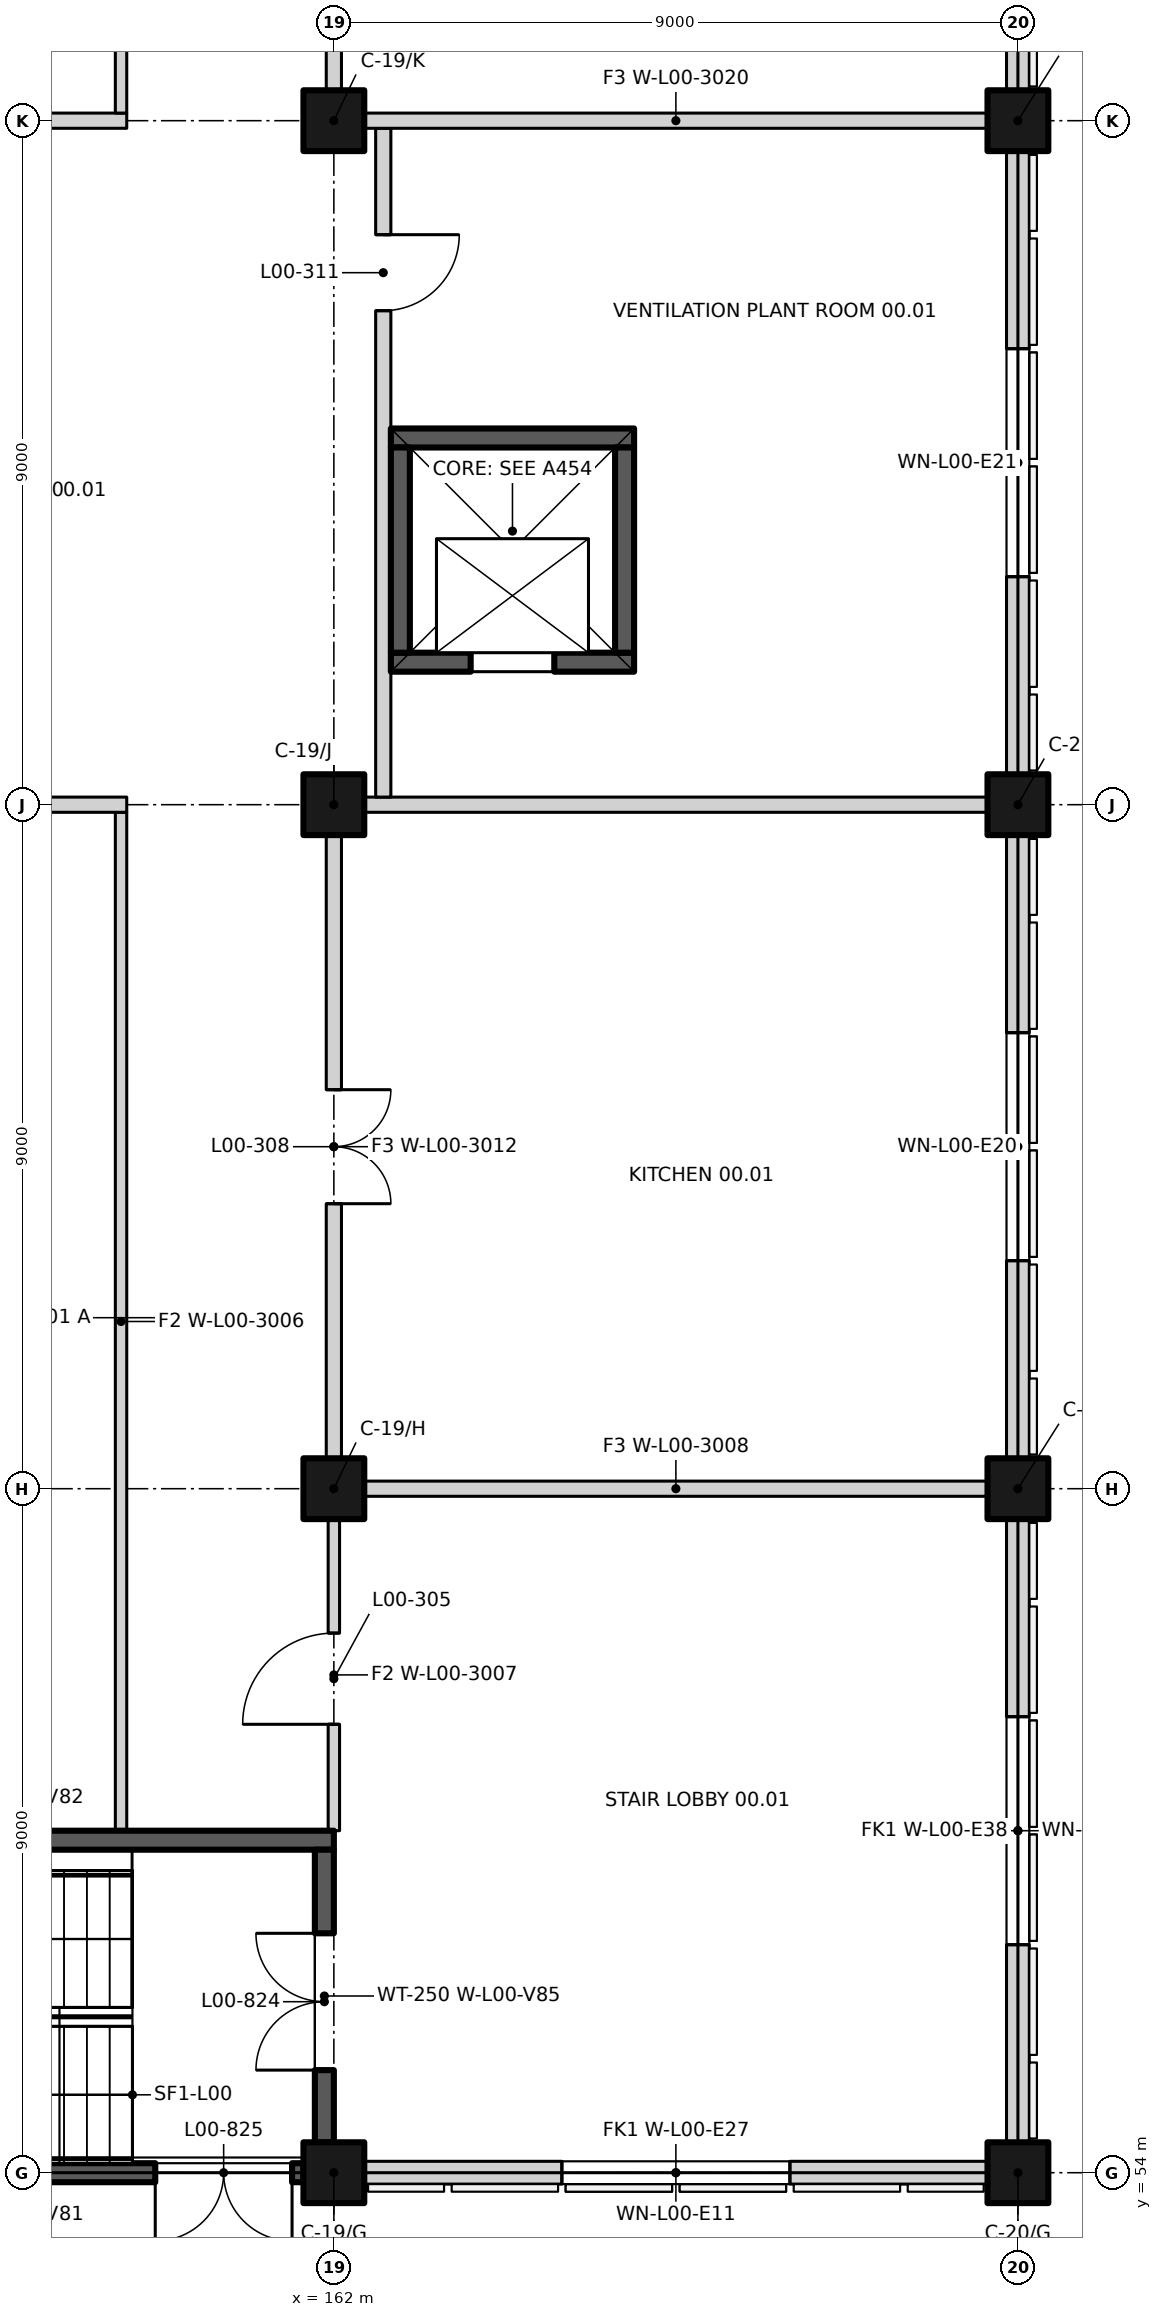
"""IFC4 building model, lengths in metres.
Left out: names, types, materials, properties, quantities, classifications, styles, units other than length and angle.
Written with IfcOpenShell. Run it as: python <this file> out.ifc"""

import sys

from ifc_helpers import new_model, si_unit, direction, frame, frame_2d, origin, origin_2d, place, context, subcontext, project, spatial, rectangle, extrude, element, fill, save


model = new_model("IFC4")
c1 = context("Model", 3, precision=1e-05, world=origin(), true_north=direction((0.0, 1.0)))
c2 = subcontext(c1, "Body", "Model", "MODEL_VIEW")
j1 = project(units=[si_unit("LENGTHUNIT", "METRE"), si_unit("PLANEANGLEUNIT", "RADIAN")], contexts=[c1])
p1 = place(None, origin())
s1 = spatial("IfcSite", under=j1, at=p1, CompositionType="ELEMENT")
p2 = place(p1, origin())
s2 = spatial("IfcBuilding", under=s1, at=p2, CompositionType="ELEMENT")
p3 = place(p2, origin())
s3 = spatial("IfcBuildingStorey", under=s2, at=p3, CompositionType="ELEMENT", Elevation=0.0)
for number, where, z_axis, x_axis in (
    (1, (162.0, 54.0, 0.0), (0.0, 0.0, 1.0), (1.0, 0.0, 0.0)),
    (2, (171.0, 54.0, 0.0), (0.0, 0.0, 1.0), (1.0, 0.0, 0.0)),
    (3, (162.0, 63.0, 0.0), (0.0, 0.0, 1.0), (1.0, 0.0, 0.0)),
    (4, (171.0, 63.0, 0.0), (0.0, 0.0, 1.0), (1.0, 0.0, 0.0)),
    (5, (162.0, 72.0, 0.0), (0.0, 0.0, 1.0), (1.0, 0.0, 0.0)),
    (6, (171.0, 72.0, 0.0), (0.0, 0.0, 1.0), (1.0, 0.0, 0.0)),
    (7, (162.0, 81.0, 0.0), (0.0, 0.0, 1.0), (1.0, 0.0, 0.0)),
    (8, (171.0, 81.0, 0.0), (0.0, 0.0, 1.0), (1.0, 0.0, 0.0)),
):
    element("IfcColumn", number, at=place(p3, frame(where, z_axis=z_axis, x_axis=x_axis)), inside=s3, PredefinedType="COLUMN", context=c2, shape_type="SweptSolid", body=[
        extrude(rectangle(XDim=0.8, YDim=0.8, at=origin_2d()), origin(), (0.0, 0.0, 1.0), 6.0),
    ])
p4 = place(p3, frame((153.4, 54.0, 0.0), z_axis=(0.0, 0.0, 1.0), x_axis=(1.0, 0.0, 0.0)))
e9 = element("IfcWall", 9, at=p4, inside=s3, PredefinedType="SHEAR", context=c2, shape_type="SweptSolid", body=[
    extrude(rectangle(XDim=8.2, YDim=0.25, at=frame_2d((4.1, 0.0))), origin(), (0.0, 0.0, 1.0), 6.0),
])
p5 = place(p4, frame((8.05, 0.0, 0.0), z_axis=(0.0, 0.0, 1.0), x_axis=(-1.0, 0.0, 0.0)))
e10 = element("IfcOpeningElement", 10, at=p5, cuts=e9, PredefinedType="OPENING", context=c2, shape_type="SweptSolid", body=[
    extrude(rectangle(XDim=1.8, YDim=2.1, at=frame_2d((0.9, 1.05))), frame((0.0, 0.135, 0.0), z_axis=(0.0, -1.0, 0.0), x_axis=(1.0, 0.0, 0.0)), (0.0, 0.0, 1.0), 0.27),
])
p6 = place(p3, frame((153.0, 58.375, 0.0), z_axis=(0.0, 0.0, 1.0), x_axis=(1.0, 0.0, 0.0)))
e11 = element("IfcWall", 11, at=p6, inside=s3, PredefinedType="SHEAR", context=c2, shape_type="SweptSolid", body=[
    extrude(rectangle(XDim=9.0, YDim=0.25, at=frame_2d((4.5, 0.0))), origin(), (0.0, 0.0, 1.0), 6.0),
])
p7 = place(p3, frame((161.875, 54.4, 0.0), z_axis=(0.0, 0.0, 1.0), x_axis=(0.0, 1.0, 0.0)))
e12 = element("IfcWall", 12, at=p7, inside=s3, PredefinedType="SHEAR", context=c2, shape_type="SweptSolid", body=[
    extrude(rectangle(XDim=3.85, YDim=0.25, at=frame_2d((1.925, 0.0))), origin(), (0.0, 0.0, 1.0), 6.0),
])
p8 = place(p7, frame((0.95, 0.0, 0.0)))
e13 = element("IfcOpeningElement", 13, at=p8, cuts=e12, PredefinedType="OPENING", context=c2, shape_type="SweptSolid", body=[
    extrude(rectangle(XDim=1.8, YDim=2.1, at=frame_2d((0.9, 1.05))), frame((0.0, 0.135, 0.0), z_axis=(0.0, -1.0, 0.0), x_axis=(1.0, 0.0, 0.0)), (0.0, 0.0, 1.0), 0.27),
])
p9 = place(p3, frame((162.75, 73.875, -1.6), z_axis=(0.0, 0.0, 1.0), x_axis=(1.0, 0.0, 0.0)))
e14 = element("IfcWall", 14, at=p9, inside=s3, PredefinedType="SHEAR", context=c2, shape_type="SweptSolid", body=[
    extrude(rectangle(XDim=3.2, YDim=0.25, at=frame_2d((1.6, 0.0))), origin(), (0.0, 0.0, 1.0), 7.6),
])
p10 = place(p9, frame((1.05, 0.0, 1.6)))
e15 = element("IfcOpeningElement", 15, at=p10, cuts=e14, PredefinedType="OPENING", context=c2, shape_type="SweptSolid", body=[
    extrude(rectangle(XDim=1.1, YDim=2.1, at=frame_2d((0.55, 1.05))), frame((0.0, 0.135, 0.0), z_axis=(0.0, -1.0, 0.0), x_axis=(1.0, 0.0, 0.0)), (0.0, 0.0, 1.0), 0.27),
])
p11 = place(p3, frame((162.75, 76.825, -1.6), z_axis=(0.0, 0.0, 1.0), x_axis=(1.0, 0.0, 0.0)))
e16 = element("IfcWall", 16, at=p11, inside=s3, PredefinedType="SHEAR", context=c2, shape_type="SweptSolid", body=[
    extrude(rectangle(XDim=3.2, YDim=0.25, at=frame_2d((1.6, 0.0))), origin(), (0.0, 0.0, 1.0), 7.6),
])
for number, where, z_axis, x_axis in (
    (17, (162.875, 74.0, -1.6), (0.0, 0.0, 1.0), (0.0, 1.0, 0.0)),
    (18, (165.825, 74.0, -1.6), (0.0, 0.0, 1.0), (0.0, 1.0, 0.0)),
):
    element("IfcWall", number, at=place(p3, frame(where, z_axis=z_axis, x_axis=x_axis)), inside=s3, PredefinedType="SHEAR", context=c2, shape_type="SweptSolid", body=[
        extrude(rectangle(XDim=2.7, YDim=0.25, at=frame_2d((1.35, 0.0))), origin(), (0.0, 0.0, 1.0), 7.6),
    ])
p12 = place(p3, frame((170.6, 54.0, 0.0), z_axis=(0.0, 0.0, 1.0), x_axis=(-1.0, 0.0, 0.0)))
e19 = element("IfcWall", 19, at=p12, inside=s3, PredefinedType="SOLIDWALL", context=c2, shape_type="SweptSolid", body=[
    extrude(rectangle(XDim=8.2, YDim=0.3, at=frame_2d((4.1, 0.0))), origin(), (0.0, 0.0, 1.0), 5.2),
])
p13 = place(p12, frame((2.6, 0.0, 0.9)))
e20 = element("IfcOpeningElement", 20, at=p13, cuts=e19, PredefinedType="OPENING", context=c2, shape_type="SweptSolid", body=[
    extrude(rectangle(XDim=3.0, YDim=2.1, at=frame_2d((1.5, 1.05))), frame((0.0, 0.16, 0.0), z_axis=(0.0, -1.0, 0.0), x_axis=(1.0, 0.0, 0.0)), (0.0, 0.0, 1.0), 0.32),
])
p14 = place(p3, frame((171.0, 62.6, 0.0), z_axis=(0.0, 0.0, 1.0), x_axis=(0.0, -1.0, 0.0)))
e21 = element("IfcWall", 21, at=p14, inside=s3, PredefinedType="SOLIDWALL", context=c2, shape_type="SweptSolid", body=[
    extrude(rectangle(XDim=8.2, YDim=0.3, at=frame_2d((4.1, 0.0))), origin(), (0.0, 0.0, 1.0), 5.2),
])
p15 = place(p14, frame((2.6, 0.0, 0.9)))
e22 = element("IfcOpeningElement", 22, at=p15, cuts=e21, PredefinedType="OPENING", context=c2, shape_type="SweptSolid", body=[
    extrude(rectangle(XDim=3.0, YDim=2.1, at=frame_2d((1.5, 1.05))), frame((0.0, 0.16, 0.0), z_axis=(0.0, -1.0, 0.0), x_axis=(1.0, 0.0, 0.0)), (0.0, 0.0, 1.0), 0.32),
])
p16 = place(p3, frame((171.0, 71.6, 0.0), z_axis=(0.0, 0.0, 1.0), x_axis=(0.0, -1.0, 0.0)))
e23 = element("IfcWall", 23, at=p16, inside=s3, PredefinedType="SOLIDWALL", context=c2, shape_type="SweptSolid", body=[
    extrude(rectangle(XDim=8.2, YDim=0.3, at=frame_2d((4.1, 0.0))), origin(), (0.0, 0.0, 1.0), 5.2),
])
p17 = place(p16, frame((2.6, 0.0, 0.9)))
e24 = element("IfcOpeningElement", 24, at=p17, cuts=e23, PredefinedType="OPENING", context=c2, shape_type="SweptSolid", body=[
    extrude(rectangle(XDim=3.0, YDim=2.1, at=frame_2d((1.5, 1.05))), frame((0.0, 0.16, 0.0), z_axis=(0.0, -1.0, 0.0), x_axis=(1.0, 0.0, 0.0)), (0.0, 0.0, 1.0), 0.32),
])
p18 = place(p3, frame((171.0, 80.6, 0.0), z_axis=(0.0, 0.0, 1.0), x_axis=(0.0, -1.0, 0.0)))
e25 = element("IfcWall", 25, at=p18, inside=s3, PredefinedType="SOLIDWALL", context=c2, shape_type="SweptSolid", body=[
    extrude(rectangle(XDim=8.2, YDim=0.3, at=frame_2d((4.1, 0.0))), origin(), (0.0, 0.0, 1.0), 5.2),
])
p19 = place(p18, frame((2.6, 0.0, 0.9)))
e26 = element("IfcOpeningElement", 26, at=p19, cuts=e25, PredefinedType="OPENING", context=c2, shape_type="SweptSolid", body=[
    extrude(rectangle(XDim=3.0, YDim=2.1, at=frame_2d((1.5, 1.05))), frame((0.0, 0.16, 0.0), z_axis=(0.0, -1.0, 0.0), x_axis=(1.0, 0.0, 0.0)), (0.0, 0.0, 1.0), 0.32),
])
p20 = place(p3, frame((171.0, 89.6, 0.0), z_axis=(0.0, 0.0, 1.0), x_axis=(0.0, -1.0, 0.0)))
e27 = element("IfcWall", 27, at=p20, inside=s3, PredefinedType="SOLIDWALL", context=c2, shape_type="SweptSolid", body=[
    extrude(rectangle(XDim=8.2, YDim=0.3, at=frame_2d((4.1, 0.0))), origin(), (0.0, 0.0, 1.0), 5.2),
])
p21 = place(p20, frame((2.6, 0.0, 0.9)))
e28 = element("IfcOpeningElement", 28, at=p21, cuts=e27, PredefinedType="OPENING", context=c2, shape_type="SweptSolid", body=[
    extrude(rectangle(XDim=3.0, YDim=2.1, at=frame_2d((1.5, 1.05))), frame((0.0, 0.16, 0.0), z_axis=(0.0, -1.0, 0.0), x_axis=(1.0, 0.0, 0.0)), (0.0, 0.0, 1.0), 0.32),
])
p22 = place(p3, frame((159.2, 58.5, 0.0), z_axis=(0.0, 0.0, 1.0), x_axis=(0.0, 1.0, 0.0)))
e29 = element("IfcWall", 29, at=p22, inside=s3, PredefinedType="PARTITIONING", context=c2, shape_type="SweptSolid", body=[
    extrude(rectangle(XDim=13.4, YDim=0.15, at=frame_2d((6.7, 0.0))), origin(), (0.0, 0.0, 1.0), 5.7),
])
p23 = place(p3, frame((162.0, 58.5, 0.0), z_axis=(0.0, 0.0, 1.0), x_axis=(0.0, 1.0, 0.0)))
e30 = element("IfcWall", 30, at=p23, inside=s3, PredefinedType="PARTITIONING", context=c2, shape_type="SweptSolid", body=[
    extrude(rectangle(XDim=4.1, YDim=0.15, at=frame_2d((2.05, 0.0))), origin(), (0.0, 0.0, 1.0), 5.7),
])
p24 = place(p23, frame((1.4, 0.0, 0.0)))
e31 = element("IfcOpeningElement", 31, at=p24, cuts=e30, PredefinedType="OPENING", context=c2, shape_type="SweptSolid", body=[
    extrude(rectangle(XDim=1.2, YDim=2.1, at=frame_2d((0.6, 1.05))), frame((0.0, 0.085, 0.0), z_axis=(0.0, -1.0, 0.0), x_axis=(1.0, 0.0, 0.0)), (0.0, 0.0, 1.0), 0.17),
])
p25 = place(p3, frame((162.4, 63.0, 0.0), z_axis=(0.0, 0.0, 1.0), x_axis=(1.0, 0.0, 0.0)))
e32 = element("IfcWall", 32, at=p25, inside=s3, PredefinedType="PARTITIONING", context=c2, shape_type="SweptSolid", body=[
    extrude(rectangle(XDim=8.2, YDim=0.2, at=frame_2d((4.1, 0.0))), origin(), (0.0, 0.0, 1.0), 5.7),
])
p26 = place(p3, frame((162.0, 63.4, 0.0), z_axis=(0.0, 0.0, 1.0), x_axis=(0.0, 1.0, 0.0)))
e33 = element("IfcWall", 33, at=p26, inside=s3, PredefinedType="PARTITIONING", context=c2, shape_type="SweptSolid", body=[
    extrude(rectangle(XDim=8.2, YDim=0.2, at=frame_2d((4.1, 0.0))), origin(), (0.0, 0.0, 1.0), 5.7),
])
p27 = place(p26, frame((4.85, 0.0, 0.0), z_axis=(0.0, 0.0, 1.0), x_axis=(-1.0, 0.0, 0.0)))
e34 = element("IfcOpeningElement", 34, at=p27, cuts=e33, PredefinedType="OPENING", context=c2, shape_type="SweptSolid", body=[
    extrude(rectangle(XDim=1.5, YDim=2.4, at=frame_2d((0.75, 1.2))), frame((0.0, 0.11, 0.0), z_axis=(0.0, -1.0, 0.0), x_axis=(1.0, 0.0, 0.0)), (0.0, 0.0, 1.0), 0.22),
])
p28 = place(p3, frame((153.4, 72.0, 0.0), z_axis=(0.0, 0.0, 1.0), x_axis=(1.0, 0.0, 0.0)))
e35 = element("IfcWall", 35, at=p28, inside=s3, PredefinedType="PARTITIONING", context=c2, shape_type="SweptSolid", body=[
    extrude(rectangle(XDim=5.875, YDim=0.2, at=frame_2d((2.938, 0.0))), origin(), (0.0, 0.0, 1.0), 5.7),
])
p29 = place(p3, frame((162.4, 72.0, 0.0), z_axis=(0.0, 0.0, 1.0), x_axis=(1.0, 0.0, 0.0)))
e36 = element("IfcWall", 36, at=p29, inside=s3, PredefinedType="PARTITIONING", context=c2, shape_type="SweptSolid", body=[
    extrude(rectangle(XDim=8.2, YDim=0.2, at=frame_2d((4.1, 0.0))), origin(), (0.0, 0.0, 1.0), 5.2),
])
p30 = place(p3, frame((162.65, 72.1, 0.0), z_axis=(0.0, 0.0, 1.0), x_axis=(0.0, 1.0, 0.0)))
e37 = element("IfcWall", 37, at=p30, inside=s3, PredefinedType="PARTITIONING", context=c2, shape_type="SweptSolid", body=[
    extrude(rectangle(XDim=8.8, YDim=0.2, at=frame_2d((4.4, 0.0))), origin(), (0.0, 0.0, 1.0), 5.2),
])
p31 = place(p30, frame((7.4, 0.0, 0.0), z_axis=(0.0, 0.0, 1.0), x_axis=(-1.0, 0.0, 0.0)))
e38 = element("IfcOpeningElement", 38, at=p31, cuts=e37, PredefinedType="OPENING", context=c2, shape_type="SweptSolid", body=[
    extrude(rectangle(XDim=1.0, YDim=2.1, at=frame_2d((0.5, 1.05))), frame((0.0, 0.11, 0.0), z_axis=(0.0, -1.0, 0.0), x_axis=(1.0, 0.0, 0.0)), (0.0, 0.0, 1.0), 0.22),
])
p32 = place(p3, frame((153.4, 81.0, 0.0), z_axis=(0.0, 0.0, 1.0), x_axis=(1.0, 0.0, 0.0)))
e39 = element("IfcWall", 39, at=p32, inside=s3, PredefinedType="PARTITIONING", context=c2, shape_type="SweptSolid", body=[
    extrude(rectangle(XDim=5.875, YDim=0.2, at=frame_2d((2.938, 0.0))), origin(), (0.0, 0.0, 1.0), 5.7),
])
p33 = place(p3, frame((162.4, 81.0, 0.0), z_axis=(0.0, 0.0, 1.0), x_axis=(1.0, 0.0, 0.0)))
e40 = element("IfcWall", 40, at=p33, inside=s3, PredefinedType="PARTITIONING", context=c2, shape_type="SweptSolid", body=[
    extrude(rectangle(XDim=8.2, YDim=0.2, at=frame_2d((4.1, 0.0))), origin(), (0.0, 0.0, 1.0), 5.2),
])
p34 = place(p3, frame((159.2, 81.1, 0.0), z_axis=(0.0, 0.0, 1.0), x_axis=(0.0, 1.0, 0.0)))
e41 = element("IfcWall", 41, at=p34, inside=s3, PredefinedType="PARTITIONING", context=c2, shape_type="SweptSolid", body=[
    extrude(rectangle(XDim=8.85, YDim=0.15, at=frame_2d((4.425, 0.0))), origin(), (0.0, 0.0, 1.0), 5.7),
])
p35 = place(p3, frame((162.0, 81.4, 0.0), z_axis=(0.0, 0.0, 1.0), x_axis=(0.0, 1.0, 0.0)))
e42 = element("IfcWall", 42, at=p35, inside=s3, PredefinedType="PARTITIONING", context=c2, shape_type="SweptSolid", body=[
    extrude(rectangle(XDim=8.2, YDim=0.2, at=frame_2d((4.1, 0.0))), origin(), (0.0, 0.0, 1.0), 5.7),
])
p36 = place(p35, frame((4.85, 0.0, 0.0), z_axis=(0.0, 0.0, 1.0), x_axis=(-1.0, 0.0, 0.0)))
e43 = element("IfcOpeningElement", 43, at=p36, cuts=e42, PredefinedType="OPENING", context=c2, shape_type="SweptSolid", body=[
    extrude(rectangle(XDim=1.5, YDim=2.4, at=frame_2d((0.75, 1.2))), frame((0.0, 0.11, 0.0), z_axis=(0.0, -1.0, 0.0), x_axis=(1.0, 0.0, 0.0)), (0.0, 0.0, 1.0), 0.22),
])
p37 = place(p8, origin())
e44 = element("IfcDoor", 44, at=p37, inside=s3, OperationType="DOUBLE_DOOR_SINGLE_SWING", PredefinedType="DOOR", context=c2, shape_type="SweptSolid", body=[
    extrude(rectangle(XDim=1.8, YDim=2.1, at=frame_2d((0.9, 1.05))), frame((0.0, 0.025, 0.0), z_axis=(0.0, -1.0, 0.0), x_axis=(1.0, 0.0, 0.0)), (0.0, 0.0, 1.0), 0.05),
])
fill(e13, e44)
p38 = place(p5, origin())
e45 = element("IfcDoor", 45, at=p38, inside=s3, OperationType="DOUBLE_DOOR_SINGLE_SWING", PredefinedType="DOOR", context=c2, shape_type="SweptSolid", body=[
    extrude(rectangle(XDim=1.8, YDim=2.1, at=frame_2d((0.9, 1.05))), frame((0.0, 0.025, 0.0), z_axis=(0.0, -1.0, 0.0), x_axis=(1.0, 0.0, 0.0)), (0.0, 0.0, 1.0), 0.05),
])
fill(e10, e45)
p39 = place(p10, origin())
e46 = element("IfcDoor", 46, at=p39, inside=s3, OperationType="DOUBLE_DOOR_SLIDING", PredefinedType="DOOR", context=c2, shape_type="SweptSolid", body=[
    extrude(rectangle(XDim=1.1, YDim=2.1, at=frame_2d((0.55, 1.05))), frame((0.0, 0.025, 0.0), z_axis=(0.0, -1.0, 0.0), x_axis=(1.0, 0.0, 0.0)), (0.0, 0.0, 1.0), 0.05),
])
fill(e15, e46)
p40 = place(p13, origin())
e47 = element("IfcWindow", 47, at=p40, inside=s3, PartitioningType="SINGLE_PANEL", PredefinedType="WINDOW", context=c2, shape_type="SweptSolid", body=[
    extrude(rectangle(XDim=3.0, YDim=2.1, at=frame_2d((1.5, 1.05))), frame((0.0, -0.03, 0.0), z_axis=(0.0, -1.0, 0.0), x_axis=(1.0, 0.0, 0.0)), (0.0, 0.0, 1.0), 0.06),
])
fill(e20, e47)
p41 = place(p15, origin())
e48 = element("IfcWindow", 48, at=p41, inside=s3, PartitioningType="SINGLE_PANEL", PredefinedType="WINDOW", context=c2, shape_type="SweptSolid", body=[
    extrude(rectangle(XDim=3.0, YDim=2.1, at=frame_2d((1.5, 1.05))), frame((0.0, -0.03, 0.0), z_axis=(0.0, -1.0, 0.0), x_axis=(1.0, 0.0, 0.0)), (0.0, 0.0, 1.0), 0.06),
])
fill(e22, e48)
p42 = place(p17, origin())
e49 = element("IfcWindow", 49, at=p42, inside=s3, PartitioningType="SINGLE_PANEL", PredefinedType="WINDOW", context=c2, shape_type="SweptSolid", body=[
    extrude(rectangle(XDim=3.0, YDim=2.1, at=frame_2d((1.5, 1.05))), frame((0.0, -0.03, 0.0), z_axis=(0.0, -1.0, 0.0), x_axis=(1.0, 0.0, 0.0)), (0.0, 0.0, 1.0), 0.06),
])
fill(e24, e49)
p43 = place(p19, origin())
e50 = element("IfcWindow", 50, at=p43, inside=s3, PartitioningType="SINGLE_PANEL", PredefinedType="WINDOW", context=c2, shape_type="SweptSolid", body=[
    extrude(rectangle(XDim=3.0, YDim=2.1, at=frame_2d((1.5, 1.05))), frame((0.0, -0.03, 0.0), z_axis=(0.0, -1.0, 0.0), x_axis=(1.0, 0.0, 0.0)), (0.0, 0.0, 1.0), 0.06),
])
fill(e26, e50)
p44 = place(p24, origin())
e51 = element("IfcDoor", 51, at=p44, inside=s3, OperationType="SINGLE_SWING_LEFT", PredefinedType="DOOR", context=c2, shape_type="SweptSolid", body=[
    extrude(rectangle(XDim=1.2, YDim=2.1, at=frame_2d((0.6, 1.05))), frame((0.0, 0.025, 0.0), z_axis=(0.0, -1.0, 0.0), x_axis=(1.0, 0.0, 0.0)), (0.0, 0.0, 1.0), 0.05),
])
fill(e31, e51)
p45 = place(p27, origin())
e52 = element("IfcDoor", 52, at=p45, inside=s3, OperationType="DOUBLE_DOOR_SINGLE_SWING", PredefinedType="DOOR", context=c2, shape_type="SweptSolid", body=[
    extrude(rectangle(XDim=1.5, YDim=2.4, at=frame_2d((0.75, 1.2))), frame((0.0, 0.025, 0.0), z_axis=(0.0, -1.0, 0.0), x_axis=(1.0, 0.0, 0.0)), (0.0, 0.0, 1.0), 0.05),
])
fill(e34, e52)
p46 = place(p31, origin())
e53 = element("IfcDoor", 53, at=p46, inside=s3, OperationType="SINGLE_SWING_LEFT", PredefinedType="DOOR", context=c2, shape_type="SweptSolid", body=[
    extrude(rectangle(XDim=1.0, YDim=2.1, at=frame_2d((0.5, 1.05))), frame((0.0, 0.025, 0.0), z_axis=(0.0, -1.0, 0.0), x_axis=(1.0, 0.0, 0.0)), (0.0, 0.0, 1.0), 0.05),
])
fill(e38, e53)
save(model, sys.argv[1])
